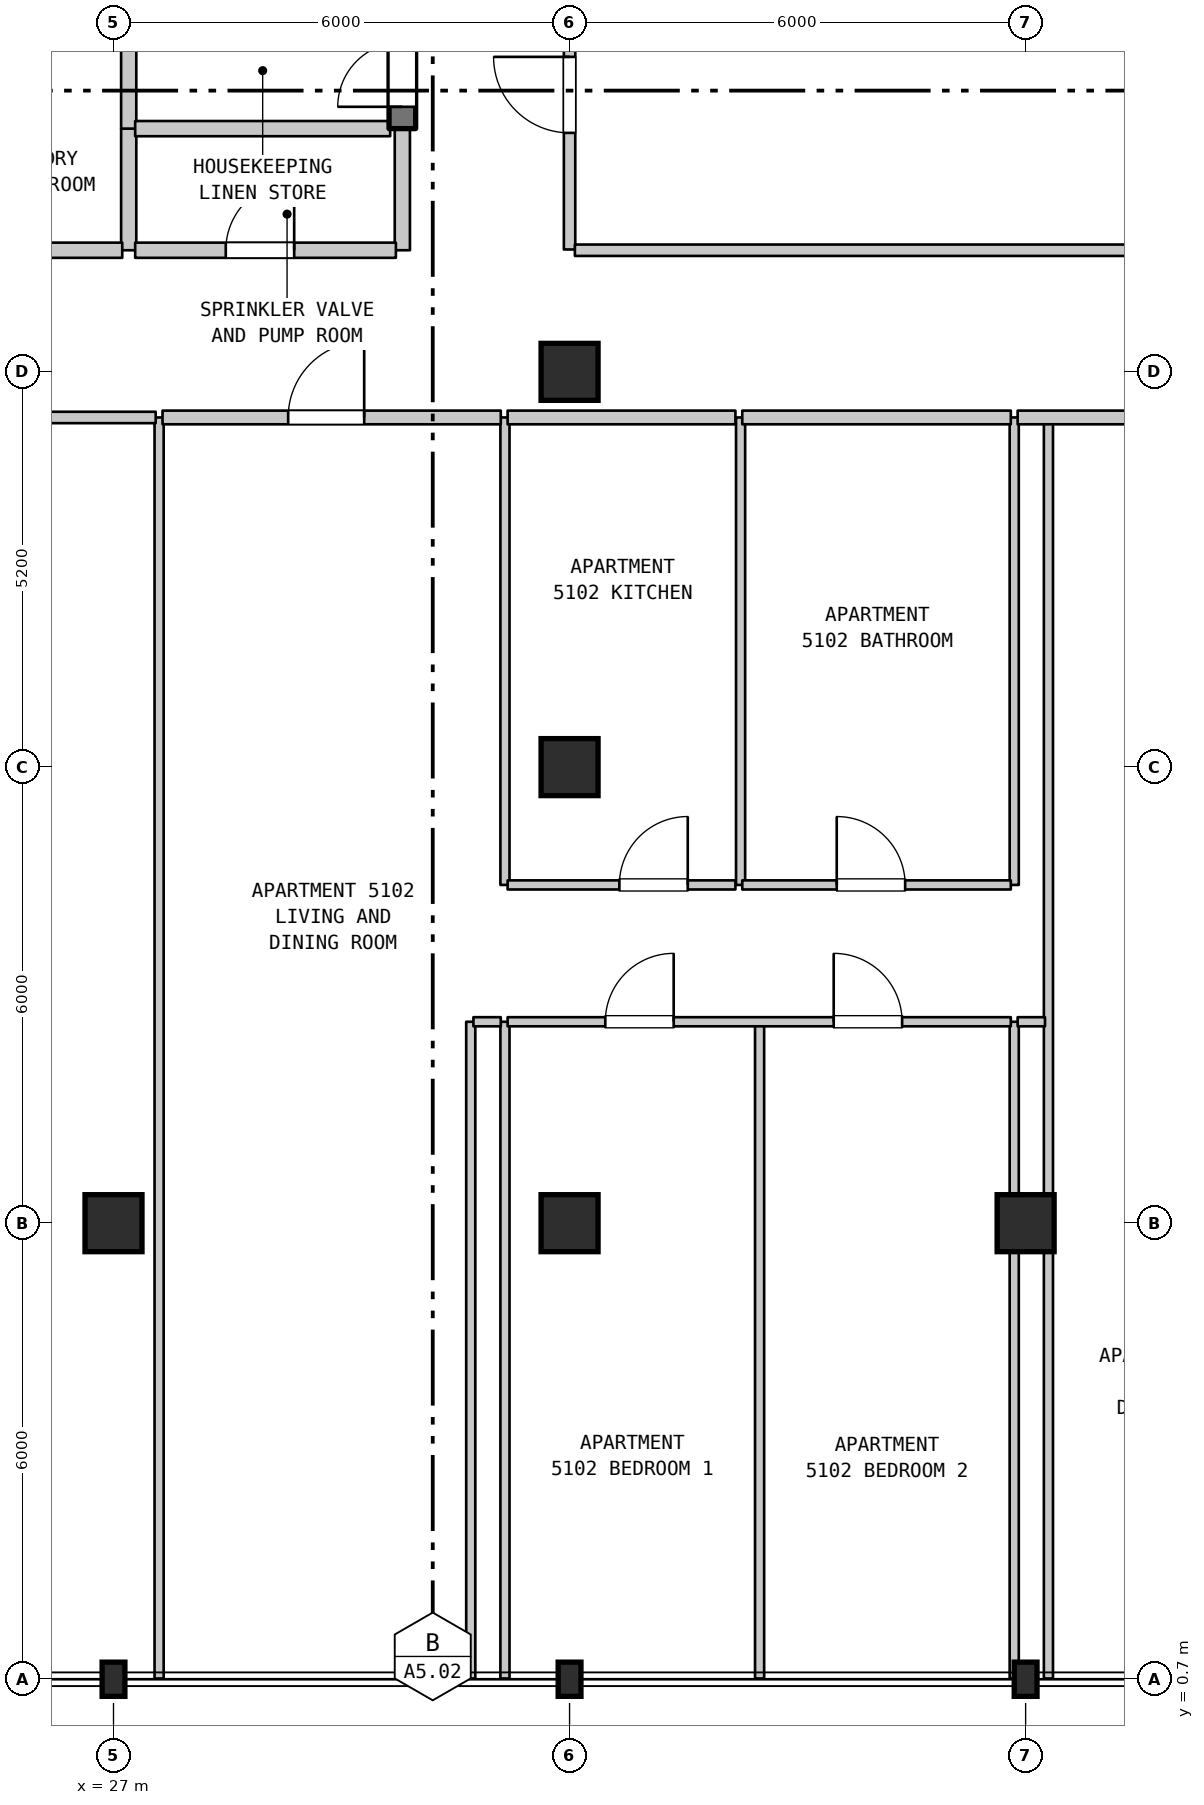
"""IFC4 building model, lengths in metres.
Left out: names, types, materials, properties, quantities, classifications, styles, units other than length and angle.
Written with IfcOpenShell. Run it as: python <this file> out.ifc"""

import sys

from ifc_helpers import new_model, si_unit, direction, frame, frame_2d, origin, origin_2d, place, context, subcontext, project, spatial, rectangle, i_section, extrude, element, fill, save


model = new_model("IFC4")
c1 = context("Model", 3, precision=1e-05, world=origin(), true_north=direction((0.0, 1.0)))
c2 = subcontext(c1, "Body", "Model", "MODEL_VIEW")
j1 = project(units=[si_unit("LENGTHUNIT", "METRE"), si_unit("PLANEANGLEUNIT", "RADIAN")], contexts=[c1])
p1 = place(None, origin())
s1 = spatial("IfcSite", under=j1, at=p1, CompositionType="ELEMENT")
p2 = place(p1, origin())
s2 = spatial("IfcBuilding", under=s1, at=p2, CompositionType="ELEMENT")
p3 = place(p2, frame((0.0, 0.0, 206.9)))
s3 = spatial("IfcBuildingStorey", under=s2, at=p3, CompositionType="ELEMENT", Elevation=206.9)
p4 = place(p3, frame((27.0, 0.7, 0.0), z_axis=(0.0, 0.0, 1.0), x_axis=(1.0, 0.0, 0.0)))
e1 = element("IfcColumn", 1, at=p4, inside=s3, PredefinedType="COLUMN", context=c2, shape_type="SweptSolid", body=[
    extrude(i_section(OverallWidth=0.3, OverallDepth=0.45, WebThickness=0.014, FlangeThickness=0.026, FilletRadius=0.027, at=origin_2d()), origin(), (0.0, 0.0, 1.0), 3.7),
])
p5 = place(p3, frame((27.0, 6.7, 0.0), z_axis=(0.0, 0.0, 1.0), x_axis=(1.0, 0.0, 0.0)))
e2 = element("IfcColumn", 2, at=p5, inside=s3, PredefinedType="COLUMN", context=c2, shape_type="SweptSolid", body=[
    extrude(rectangle(XDim=0.75, YDim=0.75, at=origin_2d()), origin(), (0.0, 0.0, 1.0), 3.7),
])
p6 = place(p3, frame((33.0, 0.7, 0.0), z_axis=(0.0, 0.0, 1.0), x_axis=(1.0, 0.0, 0.0)))
e3 = element("IfcColumn", 3, at=p6, inside=s3, PredefinedType="COLUMN", context=c2, shape_type="SweptSolid", body=[
    extrude(i_section(OverallWidth=0.3, OverallDepth=0.45, WebThickness=0.014, FlangeThickness=0.026, FilletRadius=0.027, at=origin_2d()), origin(), (0.0, 0.0, 1.0), 3.7),
])
for number, where, z_axis, x_axis in (
    (4, (33.0, 6.7, 0.0), (0.0, 0.0, 1.0), (1.0, 0.0, 0.0)),
    (5, (33.0, 12.7, 0.0), (0.0, 0.0, 1.0), (1.0, 0.0, 0.0)),
    (6, (33.0, 17.9, 0.0), (0.0, 0.0, 1.0), (1.0, 0.0, 0.0)),
):
    element("IfcColumn", number, at=place(p3, frame(where, z_axis=z_axis, x_axis=x_axis)), inside=s3, PredefinedType="COLUMN", context=c2, shape_type="SweptSolid", body=[
        extrude(rectangle(XDim=0.75, YDim=0.75, at=origin_2d()), origin(), (0.0, 0.0, 1.0), 3.7),
    ])
p7 = place(p3, frame((39.0, 0.7, 0.0), z_axis=(0.0, 0.0, 1.0), x_axis=(1.0, 0.0, 0.0)))
e7 = element("IfcColumn", 7, at=p7, inside=s3, PredefinedType="COLUMN", context=c2, shape_type="SweptSolid", body=[
    extrude(i_section(OverallWidth=0.3, OverallDepth=0.45, WebThickness=0.014, FlangeThickness=0.026, FilletRadius=0.027, at=origin_2d()), origin(), (0.0, 0.0, 1.0), 3.7),
])
p8 = place(p3, frame((39.0, 6.7, 0.0), z_axis=(0.0, 0.0, 1.0), x_axis=(1.0, 0.0, 0.0)))
e8 = element("IfcColumn", 8, at=p8, inside=s3, PredefinedType="COLUMN", context=c2, shape_type="SweptSolid", body=[
    extrude(rectangle(XDim=0.75, YDim=0.75, at=origin_2d()), origin(), (0.0, 0.0, 1.0), 3.7),
])
p9 = place(p3, frame((27.2, 19.5, 0.0), z_axis=(0.0, 0.0, 1.0), x_axis=(0.0, 1.0, 0.0)))
e9 = element("IfcWall", 9, at=p9, inside=s3, PredefinedType="STANDARD", context=c2, shape_type="SweptSolid", body=[
    extrude(rectangle(XDim=1.6, YDim=0.2, at=frame_2d((0.8, 0.0))), origin(), (0.0, 0.0, 1.0), 3.39),
])
p10 = place(p3, frame((27.2, 21.1, 0.0), z_axis=(0.0, 0.0, 1.0), x_axis=(0.0, 1.0, 0.0)))
e10 = element("IfcWall", 10, at=p10, inside=s3, PredefinedType="STANDARD", context=c2, shape_type="SweptSolid", body=[
    extrude(rectangle(XDim=1.6, YDim=0.2, at=frame_2d((0.8, 0.0))), origin(), (0.0, 0.0, 1.0), 3.39),
])
p11 = place(p3, frame((27.6, 0.71, 0.0), z_axis=(0.0, 0.0, 1.0), x_axis=(0.0, 1.0, 0.0)))
e11 = element("IfcWall", 11, at=p11, inside=s3, PredefinedType="PARTITIONING", context=c2, shape_type="SweptSolid", body=[
    extrude(rectangle(XDim=16.59, YDim=0.12, at=frame_2d((8.295, 0.0))), origin(), (0.0, 0.0, 1.0), 3.39),
])
p12 = place(p3, frame((30.8, 19.5, 0.0), z_axis=(0.0, 0.0, 1.0), x_axis=(0.0, 1.0, 0.0)))
e12 = element("IfcWall", 12, at=p12, inside=s3, PredefinedType="STANDARD", context=c2, shape_type="SweptSolid", body=[
    extrude(rectangle(XDim=1.6, YDim=0.2, at=frame_2d((0.8, 0.0))), origin(), (0.0, 0.0, 1.0), 3.39),
])
p13 = place(p3, frame((30.8, 21.1, 0.0), z_axis=(0.0, 0.0, 1.0), x_axis=(0.0, 1.0, 0.0)))
e13 = element("IfcWall", 13, at=p13, inside=s3, PredefinedType="SHEAR", context=c2, shape_type="SweptSolid", body=[
    extrude(rectangle(XDim=1.6, YDim=0.35, at=frame_2d((0.8, 0.0))), origin(), (0.0, 0.0, 1.0), 3.39),
])
p14 = place(p13, frame((0.287, 0.0, 0.0)))
e14 = element("IfcOpeningElement", 14, at=p14, cuts=e13, PredefinedType="OPENING", context=c2, shape_type="SweptSolid", body=[
    extrude(rectangle(XDim=0.85, YDim=2.1, at=frame_2d((0.425, 1.05))), frame((0.0, 0.185, 0.0), z_axis=(0.0, -1.0, 0.0), x_axis=(1.0, 0.0, 0.0)), (0.0, 0.0, 1.0), 0.37),
])
for number, where, z_axis, x_axis in (
    (15, (31.7, 0.71, 0.0), (0.0, 0.0, 1.0), (0.0, 1.0, 0.0)),
    (16, (32.15, 0.71, 0.0), (0.0, 0.0, 1.0), (0.0, 1.0, 0.0)),
):
    element("IfcWall", number, at=place(p3, frame(where, z_axis=z_axis, x_axis=x_axis)), inside=s3, PredefinedType="PARTITIONING", context=c2, shape_type="SweptSolid", body=[
        extrude(rectangle(XDim=8.64, YDim=0.12, at=frame_2d((4.32, 0.0))), origin(), (0.0, 0.0, 1.0), 3.39),
    ])
p15 = place(p3, frame((32.15, 11.15, 0.0), z_axis=(0.0, 0.0, 1.0), x_axis=(0.0, 1.0, 0.0)))
e17 = element("IfcWall", 17, at=p15, inside=s3, PredefinedType="PARTITIONING", context=c2, shape_type="SweptSolid", body=[
    extrude(rectangle(XDim=6.15, YDim=0.12, at=frame_2d((3.075, 0.0))), origin(), (0.0, 0.0, 1.0), 3.39),
])
p16 = place(p3, frame((33.0, 19.51, 0.0), z_axis=(0.0, 0.0, 1.0), x_axis=(0.0, 1.0, 0.0)))
e18 = element("IfcWall", 18, at=p16, inside=s3, PredefinedType="STANDARD", context=c2, shape_type="SweptSolid", body=[
    extrude(rectangle(XDim=5.35, YDim=0.15, at=frame_2d((2.675, 0.0))), origin(), (0.0, 0.0, 1.0), 2.99),
])
p17 = place(p16, frame((1.534, 0.0, 0.0)))
e19 = element("IfcOpeningElement", 19, at=p17, cuts=e18, PredefinedType="OPENING", context=c2, shape_type="SweptSolid", body=[
    extrude(rectangle(XDim=1.0, YDim=2.15, at=frame_2d((0.5, 1.075))), frame((0.0, 0.085, 0.0), z_axis=(0.0, -1.0, 0.0), x_axis=(1.0, 0.0, 0.0)), (0.0, 0.0, 1.0), 0.17),
])
p18 = place(p3, frame((35.25, 11.15, 0.0), z_axis=(0.0, 0.0, 1.0), x_axis=(0.0, 1.0, 0.0)))
e20 = element("IfcWall", 20, at=p18, inside=s3, PredefinedType="PARTITIONING", context=c2, shape_type="SweptSolid", body=[
    extrude(rectangle(XDim=6.15, YDim=0.12, at=frame_2d((3.075, 0.0))), origin(), (0.0, 0.0, 1.0), 3.39),
])
for number, where, z_axis, x_axis in (
    (21, (35.5, 0.71, 0.0), (0.0, 0.0, 1.0), (0.0, 1.0, 0.0)),
    (22, (38.85, 0.71, 0.0), (0.0, 0.0, 1.0), (0.0, 1.0, 0.0)),
):
    element("IfcWall", number, at=place(p3, frame(where, z_axis=z_axis, x_axis=x_axis)), inside=s3, PredefinedType="PARTITIONING", context=c2, shape_type="SweptSolid", body=[
        extrude(rectangle(XDim=8.64, YDim=0.12, at=frame_2d((4.32, 0.0))), origin(), (0.0, 0.0, 1.0), 3.39),
    ])
p19 = place(p3, frame((38.85, 11.15, 0.0), z_axis=(0.0, 0.0, 1.0), x_axis=(0.0, 1.0, 0.0)))
e23 = element("IfcWall", 23, at=p19, inside=s3, PredefinedType="PARTITIONING", context=c2, shape_type="SweptSolid", body=[
    extrude(rectangle(XDim=6.15, YDim=0.12, at=frame_2d((3.075, 0.0))), origin(), (0.0, 0.0, 1.0), 3.39),
])
p20 = place(p3, frame((39.3, 0.71, 0.0), z_axis=(0.0, 0.0, 1.0), x_axis=(0.0, 1.0, 0.0)))
e24 = element("IfcWall", 24, at=p20, inside=s3, PredefinedType="PARTITIONING", context=c2, shape_type="SweptSolid", body=[
    extrude(rectangle(XDim=16.59, YDim=0.12, at=frame_2d((8.295, 0.0))), origin(), (0.0, 0.0, 1.0), 3.39),
])
p21 = place(p3, frame((31.735, 9.35, 0.0), z_axis=(0.0, 0.0, 1.0), x_axis=(1.0, 0.0, 0.0)))
e25 = element("IfcWall", 25, at=p21, inside=s3, PredefinedType="PARTITIONING", context=c2, shape_type="SweptSolid", body=[
    extrude(rectangle(XDim=0.36, YDim=0.12, at=frame_2d((0.18, 0.0))), origin(), (0.0, 0.0, 1.0), 3.39),
])
p22 = place(p3, frame((32.185, 9.35, 0.0), z_axis=(0.0, 0.0, 1.0), x_axis=(1.0, 0.0, 0.0)))
e26 = element("IfcWall", 26, at=p22, inside=s3, PredefinedType="PARTITIONING", context=c2, shape_type="SweptSolid", body=[
    extrude(rectangle(XDim=6.62, YDim=0.12, at=frame_2d((3.31, 0.0))), origin(), (0.0, 0.0, 1.0), 3.39),
])
p23 = place(p22, frame((1.285, 0.0, 0.0)))
e27 = element("IfcOpeningElement", 27, at=p23, cuts=e26, PredefinedType="OPENING", context=c2, shape_type="SweptSolid", body=[
    extrude(rectangle(XDim=0.9, YDim=2.15, at=frame_2d((0.45, 1.075))), frame((0.0, 0.07, 0.0), z_axis=(0.0, -1.0, 0.0), x_axis=(1.0, 0.0, 0.0)), (0.0, 0.0, 1.0), 0.14),
])
p24 = place(p22, frame((4.29, 0.0, 0.0)))
e28 = element("IfcOpeningElement", 28, at=p24, cuts=e26, PredefinedType="OPENING", context=c2, shape_type="SweptSolid", body=[
    extrude(rectangle(XDim=0.9, YDim=2.15, at=frame_2d((0.45, 1.075))), frame((0.0, 0.07, 0.0), z_axis=(0.0, -1.0, 0.0), x_axis=(1.0, 0.0, 0.0)), (0.0, 0.0, 1.0), 0.14),
])
p25 = place(p3, frame((38.895, 9.35, 0.0), z_axis=(0.0, 0.0, 1.0), x_axis=(1.0, 0.0, 0.0)))
e29 = element("IfcWall", 29, at=p25, inside=s3, PredefinedType="PARTITIONING", context=c2, shape_type="SweptSolid", body=[
    extrude(rectangle(XDim=0.36, YDim=0.12, at=frame_2d((0.18, 0.0))), origin(), (0.0, 0.0, 1.0), 3.39),
])
p26 = place(p3, frame((32.185, 11.15, 0.0), z_axis=(0.0, 0.0, 1.0), x_axis=(1.0, 0.0, 0.0)))
e30 = element("IfcWall", 30, at=p26, inside=s3, PredefinedType="PARTITIONING", context=c2, shape_type="SweptSolid", body=[
    extrude(rectangle(XDim=2.997, YDim=0.12, at=frame_2d((1.499, 0.0))), origin(), (0.0, 0.0, 1.0), 3.39),
])
p27 = place(p26, frame((1.47, 0.0, 0.0)))
e31 = element("IfcOpeningElement", 31, at=p27, cuts=e30, PredefinedType="OPENING", context=c2, shape_type="SweptSolid", body=[
    extrude(rectangle(XDim=0.9, YDim=2.15, at=frame_2d((0.45, 1.075))), frame((0.0, 0.07, 0.0), z_axis=(0.0, -1.0, 0.0), x_axis=(1.0, 0.0, 0.0)), (0.0, 0.0, 1.0), 0.14),
])
p28 = place(p3, frame((35.272, 11.15, 0.0), z_axis=(0.0, 0.0, 1.0), x_axis=(1.0, 0.0, 0.0)))
e32 = element("IfcWall", 32, at=p28, inside=s3, PredefinedType="PARTITIONING", context=c2, shape_type="SweptSolid", body=[
    extrude(rectangle(XDim=3.533, YDim=0.12, at=frame_2d((1.767, 0.0))), origin(), (0.0, 0.0, 1.0), 3.39),
])
p29 = place(p28, frame((1.243, 0.0, 0.0)))
e33 = element("IfcOpeningElement", 33, at=p29, cuts=e32, PredefinedType="OPENING", context=c2, shape_type="SweptSolid", body=[
    extrude(rectangle(XDim=0.9, YDim=2.1, at=frame_2d((0.45, 1.05))), frame((0.0, 0.07, 0.0), z_axis=(0.0, -1.0, 0.0), x_axis=(1.0, 0.0, 0.0)), (0.0, 0.0, 1.0), 0.14),
])
p30 = place(p3, frame((21.045, 17.3, 0.0), z_axis=(0.0, 0.0, 1.0), x_axis=(1.0, 0.0, 0.0)))
e34 = element("IfcWall", 34, at=p30, inside=s3, PredefinedType="STANDARD", context=c2, shape_type="SweptSolid", body=[
    extrude(rectangle(XDim=6.51, YDim=0.15, at=frame_2d((3.255, 0.0))), origin(), (0.0, 0.0, 1.0), 3.39),
])
p31 = place(p30, frame((2.755, 0.0, 0.0)))
e35 = element("IfcOpeningElement", 35, at=p31, cuts=e34, PredefinedType="OPENING", context=c2, shape_type="SweptSolid", body=[
    extrude(rectangle(XDim=1.0, YDim=2.15, at=frame_2d((0.5, 1.075))), frame((0.0, 0.085, 0.0), z_axis=(0.0, -1.0, 0.0), x_axis=(1.0, 0.0, 0.0)), (0.0, 0.0, 1.0), 0.17),
])
p32 = place(p3, frame((27.645, 17.3, 0.0), z_axis=(0.0, 0.0, 1.0), x_axis=(1.0, 0.0, 0.0)))
e36 = element("IfcWall", 36, at=p32, inside=s3, PredefinedType="STANDARD", context=c2, shape_type="SweptSolid", body=[
    extrude(rectangle(XDim=4.45, YDim=0.18, at=frame_2d((2.225, 0.0))), origin(), (0.0, 0.0, 1.0), 3.39),
])
p33 = place(p32, frame((1.653, 0.0, 0.0)))
e37 = element("IfcOpeningElement", 37, at=p33, cuts=e36, PredefinedType="OPENING", context=c2, shape_type="SweptSolid", body=[
    extrude(rectangle(XDim=1.0, YDim=2.15, at=frame_2d((0.5, 1.075))), frame((0.0, 0.1, 0.0), z_axis=(0.0, -1.0, 0.0), x_axis=(1.0, 0.0, 0.0)), (0.0, 0.0, 1.0), 0.2),
])
p34 = place(p3, frame((32.185, 17.3, 0.0), z_axis=(0.0, 0.0, 1.0), x_axis=(1.0, 0.0, 0.0)))
e38 = element("IfcWall", 38, at=p34, inside=s3, PredefinedType="STANDARD", context=c2, shape_type="SweptSolid", body=[
    extrude(rectangle(XDim=2.997, YDim=0.18, at=frame_2d((1.499, 0.0))), origin(), (0.0, 0.0, 1.0), 3.39),
])
p35 = place(p3, frame((35.272, 17.3, 0.0), z_axis=(0.0, 0.0, 1.0), x_axis=(1.0, 0.0, 0.0)))
e39 = element("IfcWall", 39, at=p35, inside=s3, PredefinedType="STANDARD", context=c2, shape_type="SweptSolid", body=[
    extrude(rectangle(XDim=3.533, YDim=0.18, at=frame_2d((1.767, 0.0))), origin(), (0.0, 0.0, 1.0), 3.39),
])
p36 = place(p3, frame((38.895, 17.3, 0.0), z_axis=(0.0, 0.0, 1.0), x_axis=(1.0, 0.0, 0.0)))
e40 = element("IfcWall", 40, at=p36, inside=s3, PredefinedType="STANDARD", context=c2, shape_type="SweptSolid", body=[
    extrude(rectangle(XDim=3.96, YDim=0.18, at=frame_2d((1.98, 0.0))), origin(), (0.0, 0.0, 1.0), 3.39),
])
p37 = place(p36, frame((1.609, 0.0, 0.0)))
e41 = element("IfcOpeningElement", 41, at=p37, cuts=e40, PredefinedType="OPENING", context=c2, shape_type="SweptSolid", body=[
    extrude(rectangle(XDim=1.0, YDim=2.15, at=frame_2d((0.5, 1.075))), frame((0.0, 0.1, 0.0), z_axis=(0.0, -1.0, 0.0), x_axis=(1.0, 0.0, 0.0)), (0.0, 0.0, 1.0), 0.2),
])
p38 = place(p3, frame((23.96, 19.5, 0.0), z_axis=(0.0, 0.0, 1.0), x_axis=(1.0, 0.0, 0.0)))
e42 = element("IfcWall", 42, at=p38, inside=s3, PredefinedType="STANDARD", context=c2, shape_type="SweptSolid", body=[
    extrude(rectangle(XDim=3.155, YDim=0.2, at=frame_2d((1.578, 0.0))), origin(), (0.0, 0.0, 1.0), 3.39),
])
p39 = place(p38, frame((0.991, 0.0, 0.0)))
e43 = element("IfcOpeningElement", 43, at=p39, cuts=e42, PredefinedType="OPENING", context=c2, shape_type="SweptSolid", body=[
    extrude(rectangle(XDim=0.95, YDim=2.15, at=frame_2d((0.475, 1.075))), frame((0.0, 0.11, 0.0), z_axis=(0.0, -1.0, 0.0), x_axis=(1.0, 0.0, 0.0)), (0.0, 0.0, 1.0), 0.22),
])
p40 = place(p3, frame((27.285, 19.5, 0.0), z_axis=(0.0, 0.0, 1.0), x_axis=(1.0, 0.0, 0.0)))
e44 = element("IfcWall", 44, at=p40, inside=s3, PredefinedType="STANDARD", context=c2, shape_type="SweptSolid", body=[
    extrude(rectangle(XDim=3.43, YDim=0.2, at=frame_2d((1.715, 0.0))), origin(), (0.0, 0.0, 1.0), 3.39),
])
p41 = place(p40, frame((1.192, 0.0, 0.0)))
e45 = element("IfcOpeningElement", 45, at=p41, cuts=e44, PredefinedType="OPENING", context=c2, shape_type="SweptSolid", body=[
    extrude(rectangle(XDim=0.9, YDim=2.15, at=frame_2d((0.45, 1.075))), frame((0.0, 0.11, 0.0), z_axis=(0.0, -1.0, 0.0), x_axis=(1.0, 0.0, 0.0)), (0.0, 0.0, 1.0), 0.22),
])
p42 = place(p3, frame((33.07, 19.5, 0.0), z_axis=(0.0, 0.0, 1.0), x_axis=(1.0, 0.0, 0.0)))
e46 = element("IfcWall", 46, at=p42, inside=s3, PredefinedType="STANDARD", context=c2, shape_type="SweptSolid", body=[
    extrude(rectangle(XDim=21.51, YDim=0.15, at=frame_2d((10.755, 0.0))), origin(), (0.0, 0.0, 1.0), 3.39),
])
p43 = place(p42, frame((10.185, 0.0, 0.0)))
e47 = element("IfcOpeningElement", 47, at=p43, cuts=e46, PredefinedType="OPENING", context=c2, shape_type="SweptSolid", body=[
    extrude(rectangle(XDim=1.0, YDim=2.15, at=frame_2d((0.5, 1.075))), frame((0.0, 0.085, 0.0), z_axis=(0.0, -1.0, 0.0), x_axis=(1.0, 0.0, 0.0)), (0.0, 0.0, 1.0), 0.17),
])
p44 = place(p3, frame((27.285, 21.1, 0.0), z_axis=(0.0, 0.0, 1.0), x_axis=(1.0, 0.0, 0.0)))
e48 = element("IfcWall", 48, at=p44, inside=s3, PredefinedType="STANDARD", context=c2, shape_type="SweptSolid", body=[
    extrude(rectangle(XDim=3.355, YDim=0.2, at=frame_2d((1.677, 0.0))), origin(), (0.0, 0.0, 1.0), 3.39),
])
p45 = place(p14, origin())
e49 = element("IfcDoor", 49, at=p45, inside=s3, OperationType="SINGLE_SWING_LEFT", PredefinedType="DOOR", context=c2, shape_type="SweptSolid", body=[
    extrude(rectangle(XDim=0.85, YDim=2.1, at=frame_2d((0.425, 1.05))), frame((0.0, 0.025, 0.0), z_axis=(0.0, -1.0, 0.0), x_axis=(1.0, 0.0, 0.0)), (0.0, 0.0, 1.0), 0.05),
])
fill(e14, e49)
p46 = place(p17, origin())
e50 = element("IfcDoor", 50, at=p46, inside=s3, OperationType="SINGLE_SWING_RIGHT", PredefinedType="DOOR", context=c2, shape_type="SweptSolid", body=[
    extrude(rectangle(XDim=1.0, YDim=2.15, at=frame_2d((0.5, 1.075))), frame((0.0, 0.025, 0.0), z_axis=(0.0, -1.0, 0.0), x_axis=(1.0, 0.0, 0.0)), (0.0, 0.0, 1.0), 0.05),
])
fill(e19, e50)
p47 = place(p23, origin())
e51 = element("IfcDoor", 51, at=p47, inside=s3, OperationType="SINGLE_SWING_RIGHT", PredefinedType="DOOR", context=c2, shape_type="SweptSolid", body=[
    extrude(rectangle(XDim=0.9, YDim=2.15, at=frame_2d((0.45, 1.075))), frame((0.0, 0.025, 0.0), z_axis=(0.0, -1.0, 0.0), x_axis=(1.0, 0.0, 0.0)), (0.0, 0.0, 1.0), 0.05),
])
fill(e27, e51)
p48 = place(p24, origin())
e52 = element("IfcDoor", 52, at=p48, inside=s3, OperationType="SINGLE_SWING_LEFT", PredefinedType="DOOR", context=c2, shape_type="SweptSolid", body=[
    extrude(rectangle(XDim=0.9, YDim=2.15, at=frame_2d((0.45, 1.075))), frame((0.0, 0.025, 0.0), z_axis=(0.0, -1.0, 0.0), x_axis=(1.0, 0.0, 0.0)), (0.0, 0.0, 1.0), 0.05),
])
fill(e28, e52)
p49 = place(p27, origin())
e53 = element("IfcDoor", 53, at=p49, inside=s3, OperationType="SINGLE_SWING_RIGHT", PredefinedType="DOOR", context=c2, shape_type="SweptSolid", body=[
    extrude(rectangle(XDim=0.9, YDim=2.15, at=frame_2d((0.45, 1.075))), frame((0.0, 0.025, 0.0), z_axis=(0.0, -1.0, 0.0), x_axis=(1.0, 0.0, 0.0)), (0.0, 0.0, 1.0), 0.05),
])
fill(e31, e53)
p50 = place(p29, origin())
e54 = element("IfcDoor", 54, at=p50, inside=s3, OperationType="SINGLE_SWING_LEFT", PredefinedType="DOOR", context=c2, shape_type="SweptSolid", body=[
    extrude(rectangle(XDim=0.9, YDim=2.1, at=frame_2d((0.45, 1.05))), frame((0.0, 0.025, 0.0), z_axis=(0.0, -1.0, 0.0), x_axis=(1.0, 0.0, 0.0)), (0.0, 0.0, 1.0), 0.05),
])
fill(e33, e54)
p51 = place(p33, origin())
e55 = element("IfcDoor", 55, at=p51, inside=s3, OperationType="SINGLE_SWING_RIGHT", PredefinedType="DOOR", context=c2, shape_type="SweptSolid", body=[
    extrude(rectangle(XDim=1.0, YDim=2.15, at=frame_2d((0.5, 1.075))), frame((0.0, 0.025, 0.0), z_axis=(0.0, -1.0, 0.0), x_axis=(1.0, 0.0, 0.0)), (0.0, 0.0, 1.0), 0.05),
])
fill(e37, e55)
p52 = place(p41, origin())
e56 = element("IfcDoor", 56, at=p52, inside=s3, OperationType="SINGLE_SWING_RIGHT", PredefinedType="DOOR", context=c2, shape_type="SweptSolid", body=[
    extrude(rectangle(XDim=0.9, YDim=2.15, at=frame_2d((0.45, 1.075))), frame((0.0, 0.025, 0.0), z_axis=(0.0, -1.0, 0.0), x_axis=(1.0, 0.0, 0.0)), (0.0, 0.0, 1.0), 0.05),
])
fill(e45, e56)
save(model, sys.argv[1])
